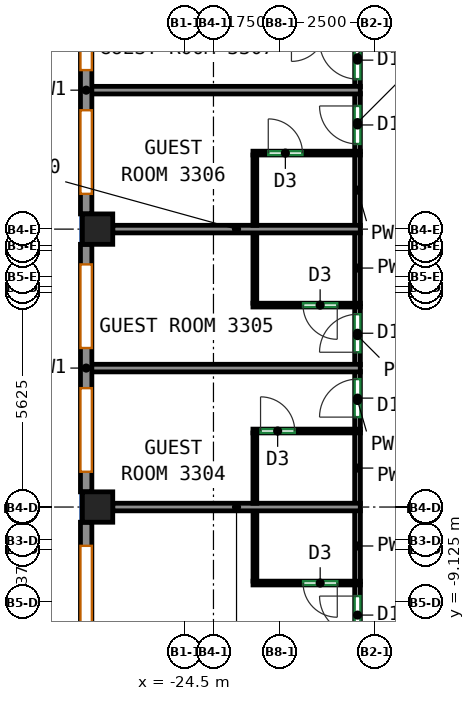
"""IFC4 building model, lengths in metres.
Left out: names, types, materials, properties, quantities, classifications, styles, units other than length and angle.
Written with IfcOpenShell. Run it as: python <this file> out.ifc"""

import sys

from ifc_helpers import new_model, si_unit, direction, frame, frame_2d, origin, origin_2d, place, context, subcontext, project, spatial, rectangle, extrude, source, transform, mapped, element, fill, save


model = new_model("IFC4")
c1 = context("Model", 3, precision=1e-05, world=origin(), true_north=direction((0.0, 1.0)))
c2 = subcontext(c1, "Body", "Model", "MODEL_VIEW")
j1 = project(units=[si_unit("LENGTHUNIT", "METRE"), si_unit("PLANEANGLEUNIT", "RADIAN")], contexts=[c1])
p1 = place(None, origin())
s1 = spatial("IfcSite", under=j1, at=p1, CompositionType="ELEMENT")
p2 = place(p1, origin())
s2 = spatial("IfcBuilding", under=s1, at=p2, CompositionType="ELEMENT")
p3 = place(p2, frame((0.0, 0.0, 147.3)))
s3 = spatial("IfcBuildingStorey", under=s2, at=p3, CompositionType="ELEMENT", Elevation=147.3)
m1 = source(origin(), c2, "Body", "SweptSolid", [
    extrude(rectangle(XDim=0.8, YDim=0.8, at=origin_2d()), origin(), (0.0, 0.0, 1.0), 3.12),
])
for number, where, z_axis, x_axis in (
    (1, (-26.8, -6.625, 0.0), (0.0, 0.0, 1.0), (1.0, 0.0, 0.0)),
    (2, (-26.8, 0.688, 0.0), (0.0, 0.0, 1.0), (1.0, 0.0, 0.0)),
):
    element("IfcColumn", number, at=place(p3, frame(where, z_axis=z_axis, x_axis=x_axis)), inside=s3, PredefinedType="COLUMN", context=c2, shape_type="MappedRepresentation", body=[
        mapped(m1, transform((0.0, 0.0, 0.0))),
    ])
m2 = source(origin(), c2, "Body", "SweptSolid", [
    extrude(rectangle(XDim=6.513, YDim=0.3, at=frame_2d((3.256, 0.0))), origin(), (0.0, 0.0, 1.0), 3.12),
])
p4 = place(p3, frame((-27.1, 7.6, 0.0), z_axis=(0.0, 0.0, 1.0), x_axis=(0.0, -1.0, 0.0)))
e3 = element("IfcWall", 3, at=p4, inside=s3, PredefinedType="SOLIDWALL", context=c2, shape_type="MappedRepresentation", body=[
    mapped(m2, transform((0.0, 0.0, 0.0))),
])
p5 = place(p4, frame((0.528, 0.0, 0.85)))
e4 = element("IfcOpeningElement", 4, at=p5, cuts=e3, PredefinedType="OPENING", context=c2, shape_type="SweptSolid", body=[
    extrude(rectangle(XDim=2.2, YDim=1.95, at=frame_2d((1.1, 0.975))), frame((0.0, 0.16, 0.0), z_axis=(0.0, -1.0, 0.0), x_axis=(1.0, 0.0, 0.0)), (0.0, 0.0, 1.0), 0.32),
])
p6 = place(p4, frame((3.784, 0.0, 0.85)))
e5 = element("IfcOpeningElement", 5, at=p6, cuts=e3, PredefinedType="OPENING", context=c2, shape_type="SweptSolid", body=[
    extrude(rectangle(XDim=2.2, YDim=1.95, at=frame_2d((1.1, 0.975))), frame((0.0, 0.16, 0.0), z_axis=(0.0, -1.0, 0.0), x_axis=(1.0, 0.0, 0.0)), (0.0, 0.0, 1.0), 0.32),
])
p7 = place(p3, frame((-27.1, 0.288, 0.0), z_axis=(0.0, 0.0, 1.0), x_axis=(0.0, -1.0, 0.0)))
e6 = element("IfcWall", 6, at=p7, inside=s3, PredefinedType="SOLIDWALL", context=c2, shape_type="MappedRepresentation", body=[
    mapped(m2, transform((0.0, 0.0, 0.0))),
])
p8 = place(p7, frame((0.528, 0.0, 0.85)))
e7 = element("IfcOpeningElement", 7, at=p8, cuts=e6, PredefinedType="OPENING", context=c2, shape_type="SweptSolid", body=[
    extrude(rectangle(XDim=2.2, YDim=1.95, at=frame_2d((1.1, 0.975))), frame((0.0, 0.16, 0.0), z_axis=(0.0, -1.0, 0.0), x_axis=(1.0, 0.0, 0.0)), (0.0, 0.0, 1.0), 0.32),
])
p9 = place(p7, frame((3.784, 0.0, 0.85)))
e8 = element("IfcOpeningElement", 8, at=p9, cuts=e6, PredefinedType="OPENING", context=c2, shape_type="SweptSolid", body=[
    extrude(rectangle(XDim=2.2, YDim=1.95, at=frame_2d((1.1, 0.975))), frame((0.0, 0.16, 0.0), z_axis=(0.0, -1.0, 0.0), x_axis=(1.0, 0.0, 0.0)), (0.0, 0.0, 1.0), 0.32),
])
m3 = source(origin(), c2, "Body", "SweptSolid", [
    extrude(rectangle(XDim=10.325, YDim=0.3, at=frame_2d((5.163, 0.0))), origin(), (0.0, 0.0, 1.0), 3.12),
])
p10 = place(p3, frame((-27.1, -7.025, 0.0), z_axis=(0.0, 0.0, 1.0), x_axis=(0.0, -1.0, 0.0)))
e9 = element("IfcWall", 9, at=p10, inside=s3, PredefinedType="SOLIDWALL", context=c2, shape_type="MappedRepresentation", body=[
    mapped(m3, transform((0.0, 0.0, 0.0))),
])
p11 = place(p10, frame((0.621, 0.0, 0.85)))
e10 = element("IfcOpeningElement", 10, at=p11, cuts=e9, PredefinedType="OPENING", context=c2, shape_type="SweptSolid", body=[
    extrude(rectangle(XDim=2.2, YDim=1.95, at=frame_2d((1.1, 0.975))), frame((0.0, 0.16, 0.0), z_axis=(0.0, -1.0, 0.0), x_axis=(1.0, 0.0, 0.0)), (0.0, 0.0, 1.0), 0.32),
])
p12 = place(p10, frame((4.062, 0.0, 0.85)))
e11 = element("IfcOpeningElement", 11, at=p12, cuts=e9, PredefinedType="OPENING", context=c2, shape_type="SweptSolid", body=[
    extrude(rectangle(XDim=2.2, YDim=1.95, at=frame_2d((1.1, 0.975))), frame((0.0, 0.16, 0.0), z_axis=(0.0, -1.0, 0.0), x_axis=(1.0, 0.0, 0.0)), (0.0, 0.0, 1.0), 0.32),
])
p13 = place(p10, frame((7.504, 0.0, 0.85)))
e12 = element("IfcOpeningElement", 12, at=p13, cuts=e9, PredefinedType="OPENING", context=c2, shape_type="SweptSolid", body=[
    extrude(rectangle(XDim=2.2, YDim=1.95, at=frame_2d((1.1, 0.975))), frame((0.0, 0.16, 0.0), z_axis=(0.0, -1.0, 0.0), x_axis=(1.0, 0.0, 0.0)), (0.0, 0.0, 1.0), 0.32),
])
p14 = place(p3, frame((-19.959, -13.863, 0.0), z_axis=(0.0, 0.0, 1.0), x_axis=(0.0, 1.0, 0.0)))
e13 = element("IfcWall", 13, at=p14, inside=s3, PredefinedType="PARTITIONING", context=c2, shape_type="SweptSolid", body=[
    extrude(rectangle(XDim=5.198, YDim=0.15, at=frame_2d((2.599, 0.0))), origin(), (0.0, 0.0, 1.0), 3.12),
])
p15 = place(p14, frame((3.895, 0.0, 0.0)))
e14 = element("IfcOpeningElement", 14, at=p15, cuts=e13, PredefinedType="OPENING", context=c2, shape_type="SweptSolid", body=[
    extrude(rectangle(XDim=1.0, YDim=2.1, at=frame_2d((0.5, 1.05))), frame((0.0, 0.085, 0.0), z_axis=(0.0, -1.0, 0.0), x_axis=(1.0, 0.0, 0.0)), (0.0, 0.0, 1.0), 0.17),
])
p16 = place(p3, frame((-19.959, -8.585, 0.0), z_axis=(0.0, 0.0, 1.0), x_axis=(0.0, 1.0, 0.0)))
e15 = element("IfcWall", 15, at=p16, inside=s3, PredefinedType="PARTITIONING", context=c2, shape_type="SweptSolid", body=[
    extrude(rectangle(XDim=1.87, YDim=0.15, at=frame_2d((0.935, 0.0))), origin(), (0.0, 0.0, 1.0), 3.12),
])
p17 = place(p3, frame((-19.959, -4.585, 0.0), z_axis=(0.0, 0.0, 1.0), x_axis=(0.0, 1.0, 0.0)))
e16 = element("IfcWall", 16, at=p17, inside=s3, PredefinedType="PARTITIONING", context=c2, shape_type="SweptSolid", body=[
    extrude(rectangle(XDim=1.526, YDim=0.15, at=frame_2d((0.763, 0.0))), origin(), (0.0, 0.0, 1.0), 3.12),
])
p18 = place(p17, frame((0.326, 0.0, 0.0)))
e17 = element("IfcOpeningElement", 17, at=p18, cuts=e16, PredefinedType="OPENING", context=c2, shape_type="SweptSolid", body=[
    extrude(rectangle(XDim=1.0, YDim=2.1, at=frame_2d((0.5, 1.05))), frame((0.0, 0.085, 0.0), z_axis=(0.0, -1.0, 0.0), x_axis=(1.0, 0.0, 0.0)), (0.0, 0.0, 1.0), 0.17),
])
p19 = place(p3, frame((-19.959, -6.535, 0.0), z_axis=(0.0, 0.0, 1.0), x_axis=(0.0, 1.0, 0.0)))
e18 = element("IfcWall", 18, at=p19, inside=s3, PredefinedType="PARTITIONING", context=c2, shape_type="SweptSolid", body=[
    extrude(rectangle(XDim=1.87, YDim=0.15, at=frame_2d((0.935, 0.0))), origin(), (0.0, 0.0, 1.0), 3.12),
])
p20 = place(p3, frame((-19.959, -2.879, 0.0), z_axis=(0.0, 0.0, 1.0), x_axis=(0.0, 1.0, 0.0)))
e19 = element("IfcWall", 19, at=p20, inside=s3, PredefinedType="PARTITIONING", context=c2, shape_type="SweptSolid", body=[
    extrude(rectangle(XDim=1.527, YDim=0.15, at=frame_2d((0.763, 0.0))), origin(), (0.0, 0.0, 1.0), 3.12),
])
p21 = place(p20, frame((0.327, 0.0, 0.0)))
e20 = element("IfcOpeningElement", 20, at=p21, cuts=e19, PredefinedType="OPENING", context=c2, shape_type="SweptSolid", body=[
    extrude(rectangle(XDim=1.0, YDim=2.1, at=frame_2d((0.5, 1.05))), frame((0.0, 0.085, 0.0), z_axis=(0.0, -1.0, 0.0), x_axis=(1.0, 0.0, 0.0)), (0.0, 0.0, 1.0), 0.17),
])
p22 = place(p3, frame((-19.959, -1.272, 0.0), z_axis=(0.0, 0.0, 1.0), x_axis=(0.0, 1.0, 0.0)))
e21 = element("IfcWall", 21, at=p22, inside=s3, PredefinedType="PARTITIONING", context=c2, shape_type="SweptSolid", body=[
    extrude(rectangle(XDim=1.87, YDim=0.15, at=frame_2d((0.935, 0.0))), origin(), (0.0, 0.0, 1.0), 3.12),
])
p23 = place(p3, frame((-19.959, 2.728, 0.0), z_axis=(0.0, 0.0, 1.0), x_axis=(0.0, 1.0, 0.0)))
e22 = element("IfcWall", 22, at=p23, inside=s3, PredefinedType="PARTITIONING", context=c2, shape_type="SweptSolid", body=[
    extrude(rectangle(XDim=1.526, YDim=0.15, at=frame_2d((0.763, 0.0))), origin(), (0.0, 0.0, 1.0), 3.12),
])
p24 = place(p23, frame((0.2, 0.0, 0.0)))
e23 = element("IfcOpeningElement", 23, at=p24, cuts=e22, PredefinedType="OPENING", context=c2, shape_type="SweptSolid", body=[
    extrude(rectangle(XDim=1.0, YDim=2.1, at=frame_2d((0.5, 1.05))), frame((0.0, 0.085, 0.0), z_axis=(0.0, -1.0, 0.0), x_axis=(1.0, 0.0, 0.0)), (0.0, 0.0, 1.0), 0.17),
])
p25 = place(p3, frame((-19.959, 0.778, 0.0), z_axis=(0.0, 0.0, 1.0), x_axis=(0.0, 1.0, 0.0)))
e24 = element("IfcWall", 24, at=p25, inside=s3, PredefinedType="PARTITIONING", context=c2, shape_type="SweptSolid", body=[
    extrude(rectangle(XDim=1.87, YDim=0.15, at=frame_2d((0.935, 0.0))), origin(), (0.0, 0.0, 1.0), 3.12),
])
p26 = place(p3, frame((-19.959, 4.434, 0.0), z_axis=(0.0, 0.0, 1.0), x_axis=(0.0, 1.0, 0.0)))
e25 = element("IfcWall", 25, at=p26, inside=s3, PredefinedType="PARTITIONING", context=c2, shape_type="SweptSolid", body=[
    extrude(rectangle(XDim=1.526, YDim=0.15, at=frame_2d((0.763, 0.0))), origin(), (0.0, 0.0, 1.0), 3.12),
])
p27 = place(p26, frame((0.2, 0.0, 0.0)))
e26 = element("IfcOpeningElement", 26, at=p27, cuts=e25, PredefinedType="OPENING", context=c2, shape_type="SweptSolid", body=[
    extrude(rectangle(XDim=1.0, YDim=2.1, at=frame_2d((0.5, 1.05))), frame((0.0, 0.085, 0.0), z_axis=(0.0, -1.0, 0.0), x_axis=(1.0, 0.0, 0.0)), (0.0, 0.0, 1.0), 0.17),
])
p28 = place(p3, frame((-22.659, -8.575, 0.0), z_axis=(0.0, 0.0, 1.0), x_axis=(0.0, 1.0, 0.0)))
e27 = element("IfcWall", 27, at=p28, inside=s3, PredefinedType="PARTITIONING", context=c2, shape_type="SweptSolid", body=[
    extrude(rectangle(XDim=1.85, YDim=0.1, at=frame_2d((0.925, 0.0))), origin(), (0.0, 0.0, 1.0), 3.12),
])
p29 = place(p3, frame((-19.886, -8.625, 0.0), z_axis=(0.0, 0.0, 1.0), x_axis=(-1.0, 0.0, 0.0)))
e28 = element("IfcWall", 28, at=p29, inside=s3, PredefinedType="PARTITIONING", context=c2, shape_type="SweptSolid", body=[
    extrude(rectangle(XDim=2.823, YDim=0.1, at=frame_2d((1.412, 0.0))), origin(), (0.0, 0.0, 1.0), 3.12),
])
p30 = place(p29, frame((0.606, 0.0, 0.0)))
e29 = element("IfcOpeningElement", 29, at=p30, cuts=e28, PredefinedType="OPENING", context=c2, shape_type="SweptSolid", body=[
    extrude(rectangle(XDim=0.9, YDim=2.1, at=frame_2d((0.45, 1.05))), frame((0.0, 0.06, 0.0), z_axis=(0.0, -1.0, 0.0), x_axis=(1.0, 0.0, 0.0)), (0.0, 0.0, 1.0), 0.12),
])
p31 = place(p3, frame((-26.4, -6.625, 0.0), z_axis=(0.0, 0.0, 1.0), x_axis=(1.0, 0.0, 0.0)))
e30 = element("IfcWall", 30, at=p31, inside=s3, PredefinedType="PARTITIONING", context=c2, shape_type="SweptSolid", body=[
    extrude(rectangle(XDim=6.514, YDim=0.2, at=frame_2d((3.257, 0.0))), origin(), (0.0, 0.0, 1.0), 2.52),
])
p32 = place(p3, frame((-22.711, -4.625, 0.0), z_axis=(0.0, 0.0, 1.0), x_axis=(1.0, 0.0, 0.0)))
e31 = element("IfcWall", 31, at=p32, inside=s3, PredefinedType="PARTITIONING", context=c2, shape_type="SweptSolid", body=[
    extrude(rectangle(XDim=2.825, YDim=0.1, at=frame_2d((1.413, 0.0))), origin(), (0.0, 0.0, 1.0), 3.12),
])
p33 = place(p32, frame((0.2, 0.0, 0.0)))
e32 = element("IfcOpeningElement", 32, at=p33, cuts=e31, PredefinedType="OPENING", context=c2, shape_type="SweptSolid", body=[
    extrude(rectangle(XDim=0.9, YDim=2.1, at=frame_2d((0.45, 1.05))), frame((0.0, 0.06, 0.0), z_axis=(0.0, -1.0, 0.0), x_axis=(1.0, 0.0, 0.0)), (0.0, 0.0, 1.0), 0.12),
])
p34 = place(p3, frame((-22.661, -6.525, 0.0), z_axis=(0.0, 0.0, 1.0), x_axis=(0.0, 1.0, 0.0)))
e33 = element("IfcWall", 33, at=p34, inside=s3, PredefinedType="PARTITIONING", context=c2, shape_type="SweptSolid", body=[
    extrude(rectangle(XDim=1.85, YDim=0.1, at=frame_2d((0.925, 0.0))), origin(), (0.0, 0.0, 1.0), 3.12),
])
p35 = place(p3, frame((-19.886, -2.969, 0.0), z_axis=(0.0, 0.0, 1.0), x_axis=(-1.0, 0.0, 0.0)))
e34 = element("IfcWall", 34, at=p35, inside=s3, PredefinedType="PARTITIONING", context=c2, shape_type="SweptSolid", body=[
    extrude(rectangle(XDim=7.114, YDim=0.2, at=frame_2d((3.557, 0.0))), origin(), (0.0, 0.0, 1.0), 3.12),
])
p36 = place(p3, frame((-19.886, -1.312, 0.0), z_axis=(0.0, 0.0, 1.0), x_axis=(-1.0, 0.0, 0.0)))
e35 = element("IfcWall", 35, at=p36, inside=s3, PredefinedType="PARTITIONING", context=c2, shape_type="SweptSolid", body=[
    extrude(rectangle(XDim=2.825, YDim=0.1, at=frame_2d((1.413, 0.0))), origin(), (0.0, 0.0, 1.0), 3.12),
])
p37 = place(p36, frame((0.607, 0.0, 0.0)))
e36 = element("IfcOpeningElement", 36, at=p37, cuts=e35, PredefinedType="OPENING", context=c2, shape_type="SweptSolid", body=[
    extrude(rectangle(XDim=0.9, YDim=2.1, at=frame_2d((0.45, 1.05))), frame((0.0, 0.06, 0.0), z_axis=(0.0, -1.0, 0.0), x_axis=(1.0, 0.0, 0.0)), (0.0, 0.0, 1.0), 0.12),
])
p38 = place(p3, frame((-22.661, -1.262, 0.0), z_axis=(0.0, 0.0, 1.0), x_axis=(0.0, 1.0, 0.0)))
e37 = element("IfcWall", 37, at=p38, inside=s3, PredefinedType="PARTITIONING", context=c2, shape_type="SweptSolid", body=[
    extrude(rectangle(XDim=1.85, YDim=0.1, at=frame_2d((0.925, 0.0))), origin(), (0.0, 0.0, 1.0), 3.12),
])
p39 = place(p3, frame((-26.4, 0.688, 0.0), z_axis=(0.0, 0.0, 1.0), x_axis=(1.0, 0.0, 0.0)))
e38 = element("IfcWall", 38, at=p39, inside=s3, PredefinedType="PARTITIONING", context=c2, shape_type="SweptSolid", body=[
    extrude(rectangle(XDim=6.514, YDim=0.2, at=frame_2d((3.257, 0.0))), origin(), (0.0, 0.0, 1.0), 2.52),
])
p40 = place(p3, frame((-22.711, 2.688, 0.0), z_axis=(0.0, 0.0, 1.0), x_axis=(1.0, 0.0, 0.0)))
e39 = element("IfcWall", 39, at=p40, inside=s3, PredefinedType="PARTITIONING", context=c2, shape_type="SweptSolid", body=[
    extrude(rectangle(XDim=2.825, YDim=0.1, at=frame_2d((1.413, 0.0))), origin(), (0.0, 0.0, 1.0), 3.12),
])
p41 = place(p40, frame((0.403, 0.0, 0.0)))
e40 = element("IfcOpeningElement", 40, at=p41, cuts=e39, PredefinedType="OPENING", context=c2, shape_type="SweptSolid", body=[
    extrude(rectangle(XDim=0.9, YDim=2.1, at=frame_2d((0.45, 1.05))), frame((0.0, 0.06, 0.0), z_axis=(0.0, -1.0, 0.0), x_axis=(1.0, 0.0, 0.0)), (0.0, 0.0, 1.0), 0.12),
])
p42 = place(p3, frame((-22.661, 0.788, 0.0), z_axis=(0.0, 0.0, 1.0), x_axis=(0.0, 1.0, 0.0)))
e41 = element("IfcWall", 41, at=p42, inside=s3, PredefinedType="PARTITIONING", context=c2, shape_type="SweptSolid", body=[
    extrude(rectangle(XDim=1.85, YDim=0.1, at=frame_2d((0.925, 0.0))), origin(), (0.0, 0.0, 1.0), 3.12),
])
p43 = place(p3, frame((-27.0, 4.344, 0.0), z_axis=(0.0, 0.0, 1.0), x_axis=(1.0, 0.0, 0.0)))
e42 = element("IfcWall", 42, at=p43, inside=s3, PredefinedType="PARTITIONING", context=c2, shape_type="SweptSolid", body=[
    extrude(rectangle(XDim=7.114, YDim=0.2, at=frame_2d((3.557, 0.0))), origin(), (0.0, 0.0, 1.0), 3.12),
])
p44 = place(p5, origin())
e43 = element("IfcWindow", 43, at=p44, inside=s3, PartitioningType="SINGLE_PANEL", PredefinedType="WINDOW", context=c2, shape_type="SweptSolid", body=[
    extrude(rectangle(XDim=2.2, YDim=1.95, at=frame_2d((1.1, 0.975))), frame((0.0, 0.03, 0.0), z_axis=(0.0, -1.0, 0.0), x_axis=(1.0, 0.0, 0.0)), (0.0, 0.0, 1.0), 0.06),
])
fill(e4, e43)
p45 = place(p6, origin())
e44 = element("IfcWindow", 44, at=p45, inside=s3, PartitioningType="SINGLE_PANEL", PredefinedType="WINDOW", context=c2, shape_type="SweptSolid", body=[
    extrude(rectangle(XDim=2.2, YDim=1.95, at=frame_2d((1.1, 0.975))), frame((0.0, 0.03, 0.0), z_axis=(0.0, -1.0, 0.0), x_axis=(1.0, 0.0, 0.0)), (0.0, 0.0, 1.0), 0.06),
])
fill(e5, e44)
p46 = place(p8, origin())
e45 = element("IfcWindow", 45, at=p46, inside=s3, PartitioningType="SINGLE_PANEL", PredefinedType="WINDOW", context=c2, shape_type="SweptSolid", body=[
    extrude(rectangle(XDim=2.2, YDim=1.95, at=frame_2d((1.1, 0.975))), frame((0.0, 0.03, 0.0), z_axis=(0.0, -1.0, 0.0), x_axis=(1.0, 0.0, 0.0)), (0.0, 0.0, 1.0), 0.06),
])
fill(e7, e45)
p47 = place(p9, origin())
e46 = element("IfcWindow", 46, at=p47, inside=s3, PartitioningType="SINGLE_PANEL", PredefinedType="WINDOW", context=c2, shape_type="SweptSolid", body=[
    extrude(rectangle(XDim=2.2, YDim=1.95, at=frame_2d((1.1, 0.975))), frame((0.0, 0.03, 0.0), z_axis=(0.0, -1.0, 0.0), x_axis=(1.0, 0.0, 0.0)), (0.0, 0.0, 1.0), 0.06),
])
fill(e8, e46)
p48 = place(p11, origin())
e47 = element("IfcWindow", 47, at=p48, inside=s3, PartitioningType="SINGLE_PANEL", PredefinedType="WINDOW", context=c2, shape_type="SweptSolid", body=[
    extrude(rectangle(XDim=2.2, YDim=1.95, at=frame_2d((1.1, 0.975))), frame((0.0, 0.03, 0.0), z_axis=(0.0, -1.0, 0.0), x_axis=(1.0, 0.0, 0.0)), (0.0, 0.0, 1.0), 0.06),
])
fill(e10, e47)
p49 = place(p15, origin())
e48 = element("IfcDoor", 48, at=p49, inside=s3, OperationType="SINGLE_SWING_RIGHT", PredefinedType="DOOR", context=c2, shape_type="SweptSolid", body=[
    extrude(rectangle(XDim=1.0, YDim=2.1, at=frame_2d((0.5, 1.05))), frame((0.0, 0.025, 0.0), z_axis=(0.0, -1.0, 0.0), x_axis=(1.0, 0.0, 0.0)), (0.0, 0.0, 1.0), 0.05),
])
fill(e14, e48)
p50 = place(p30, origin())
e49 = element("IfcDoor", 49, at=p50, inside=s3, OperationType="SINGLE_SWING_LEFT", PredefinedType="DOOR", context=c2, shape_type="SweptSolid", body=[
    extrude(rectangle(XDim=0.9, YDim=2.1, at=frame_2d((0.45, 1.05))), frame((0.0, 0.025, 0.0), z_axis=(0.0, -1.0, 0.0), x_axis=(1.0, 0.0, 0.0)), (0.0, 0.0, 1.0), 0.05),
])
fill(e29, e49)
p51 = place(p33, origin())
e50 = element("IfcDoor", 50, at=p51, inside=s3, OperationType="SINGLE_SWING_LEFT", PredefinedType="DOOR", context=c2, shape_type="SweptSolid", body=[
    extrude(rectangle(XDim=0.9, YDim=2.1, at=frame_2d((0.45, 1.05))), frame((0.0, 0.025, 0.0), z_axis=(0.0, -1.0, 0.0), x_axis=(1.0, 0.0, 0.0)), (0.0, 0.0, 1.0), 0.05),
])
fill(e32, e50)
p52 = place(p18, origin())
e51 = element("IfcDoor", 51, at=p52, inside=s3, OperationType="SINGLE_SWING_LEFT", PredefinedType="DOOR", context=c2, shape_type="SweptSolid", body=[
    extrude(rectangle(XDim=1.0, YDim=2.1, at=frame_2d((0.5, 1.05))), frame((0.0, 0.025, 0.0), z_axis=(0.0, -1.0, 0.0), x_axis=(1.0, 0.0, 0.0)), (0.0, 0.0, 1.0), 0.05),
])
fill(e17, e51)
p53 = place(p21, origin())
e52 = element("IfcDoor", 52, at=p53, inside=s3, OperationType="SINGLE_SWING_LEFT", PredefinedType="DOOR", context=c2, shape_type="SweptSolid", body=[
    extrude(rectangle(XDim=1.0, YDim=2.1, at=frame_2d((0.5, 1.05))), frame((0.0, 0.025, 0.0), z_axis=(0.0, -1.0, 0.0), x_axis=(1.0, 0.0, 0.0)), (0.0, 0.0, 1.0), 0.05),
])
fill(e20, e52)
p54 = place(p37, origin())
e53 = element("IfcDoor", 53, at=p54, inside=s3, OperationType="SINGLE_SWING_LEFT", PredefinedType="DOOR", context=c2, shape_type="SweptSolid", body=[
    extrude(rectangle(XDim=0.9, YDim=2.1, at=frame_2d((0.45, 1.05))), frame((0.0, 0.025, 0.0), z_axis=(0.0, -1.0, 0.0), x_axis=(1.0, 0.0, 0.0)), (0.0, 0.0, 1.0), 0.05),
])
fill(e36, e53)
p55 = place(p41, origin())
e54 = element("IfcDoor", 54, at=p55, inside=s3, OperationType="SINGLE_SWING_LEFT", PredefinedType="DOOR", context=c2, shape_type="SweptSolid", body=[
    extrude(rectangle(XDim=0.9, YDim=2.1, at=frame_2d((0.45, 1.05))), frame((0.0, 0.025, 0.0), z_axis=(0.0, -1.0, 0.0), x_axis=(1.0, 0.0, 0.0)), (0.0, 0.0, 1.0), 0.05),
])
fill(e40, e54)
p56 = place(p24, origin())
e55 = element("IfcDoor", 55, at=p56, inside=s3, OperationType="SINGLE_SWING_RIGHT", PredefinedType="DOOR", context=c2, shape_type="SweptSolid", body=[
    extrude(rectangle(XDim=1.0, YDim=2.1, at=frame_2d((0.5, 1.05))), frame((0.0, 0.025, 0.0), z_axis=(0.0, -1.0, 0.0), x_axis=(1.0, 0.0, 0.0)), (0.0, 0.0, 1.0), 0.05),
])
fill(e23, e55)
p57 = place(p27, origin())
e56 = element("IfcDoor", 56, at=p57, inside=s3, OperationType="SINGLE_SWING_RIGHT", PredefinedType="DOOR", context=c2, shape_type="SweptSolid", body=[
    extrude(rectangle(XDim=1.0, YDim=2.1, at=frame_2d((0.5, 1.05))), frame((0.0, 0.025, 0.0), z_axis=(0.0, -1.0, 0.0), x_axis=(1.0, 0.0, 0.0)), (0.0, 0.0, 1.0), 0.05),
])
fill(e26, e56)
save(model, sys.argv[1])
